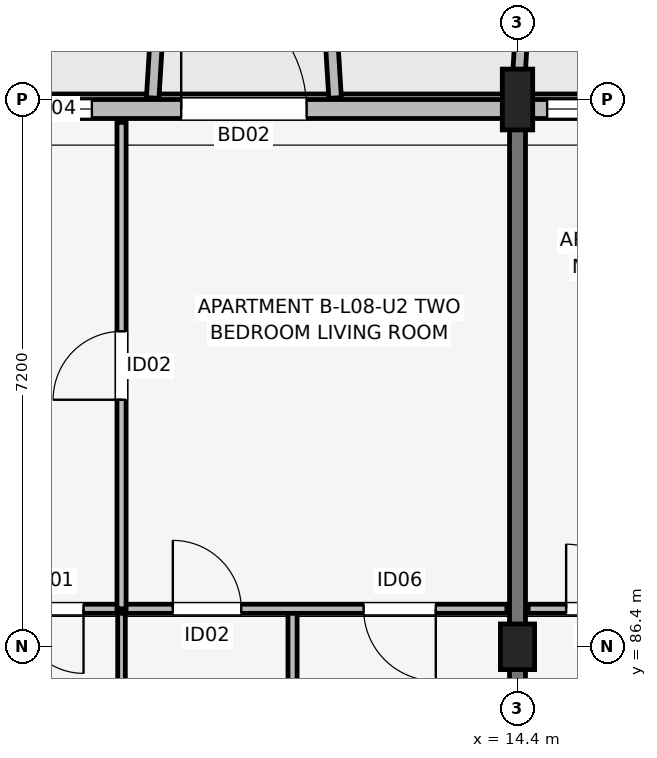
"""IFC4 building model, lengths in metres.
Left out: names, types, materials, properties, quantities, classifications, styles, units other than length and angle.
Written with IfcOpenShell. Run it as: python <this file> out.ifc"""

import sys

from ifc_helpers import new_model, si_unit, direction, frame, frame_2d, origin, origin_2d, place, context, subcontext, project, spatial, rectangle, extrude, element, fill, save


model = new_model("IFC4")
c1 = context("Model", 3, precision=1e-05, world=origin(), true_north=direction((0.0, 1.0)))
c2 = subcontext(c1, "Body", "Model", "MODEL_VIEW")
j1 = project(units=[si_unit("LENGTHUNIT", "METRE"), si_unit("PLANEANGLEUNIT", "RADIAN")], contexts=[c1])
p1 = place(None, origin())
s1 = spatial("IfcSite", under=j1, at=p1, CompositionType="ELEMENT")
p2 = place(p1, origin())
s2 = spatial("IfcBuilding", under=s1, at=p2, CompositionType="ELEMENT")
p3 = place(p2, frame((0.0, 0.0, 27.6)))
s3 = spatial("IfcBuildingStorey", under=s2, at=p3, CompositionType="ELEMENT", Elevation=27.6)
p4 = place(p3, frame((14.4, 86.4, 0.0), z_axis=(0.0, 0.0, 1.0), x_axis=(1.0, 0.0, 0.0)))
e1 = element("IfcColumn", 1, at=p4, inside=s3, PredefinedType="COLUMN", context=c2, shape_type="SweptSolid", body=[
    extrude(rectangle(XDim=0.45, YDim=0.6, at=origin_2d()), origin(), (0.0, 0.0, 1.0), 3.15),
])
p5 = place(p3, frame((14.4, 93.6, 0.0), z_axis=(0.0, 0.0, 1.0), x_axis=(1.0, 0.0, 0.0)))
e2 = element("IfcColumn", 2, at=p5, inside=s3, PredefinedType="COLUMN", context=c2, shape_type="SweptSolid", body=[
    extrude(rectangle(XDim=0.4, YDim=0.8, at=origin_2d()), origin(), (0.0, 0.0, 1.0), 3.15),
])
p6 = place(p3, frame((14.4, 83.85, 0.0), z_axis=(0.0, 0.0, 1.0), x_axis=(0.0, 1.0, 0.0)))
e3 = element("IfcWall", 3, at=p6, inside=s3, PredefinedType="SHEAR", context=c2, shape_type="SweptSolid", body=[
    extrude(rectangle(XDim=9.4, YDim=0.21, at=frame_2d((4.7, 0.0))), origin(), (0.0, 0.0, 1.0), 3.15),
])
p7 = place(p3, frame((32.8, 93.475, 0.0), z_axis=(0.0, 0.0, 1.0), x_axis=(-1.0, 0.0, 0.0)))
e4 = element("IfcWall", 4, at=p7, inside=s3, PredefinedType="SOLIDWALL", context=c2, shape_type="SweptSolid", body=[
    extrude(rectangle(XDim=29.6, YDim=0.25, at=frame_2d((14.8, 0.0))), origin(), (0.0, 0.0, 1.0), 2.43),
])
p8 = place(p7, frame((22.825, 0.0, 0.0), z_axis=(0.0, 0.0, 1.0), x_axis=(-1.0, 0.0, 0.0)))
e5 = element("IfcOpeningElement", 5, at=p8, cuts=e4, PredefinedType="OPENING", context=c2, shape_type="SweptSolid", body=[
    extrude(rectangle(XDim=1.65, YDim=2.15, at=frame_2d((0.825, 1.075))), frame((0.0, 0.135, 0.0), z_axis=(0.0, -1.0, 0.0), x_axis=(1.0, 0.0, 0.0)), (0.0, 0.0, 1.0), 0.27),
])
p9 = place(p7, frame((8.35, 0.0, 0.0), z_axis=(0.0, 0.0, 1.0), x_axis=(-1.0, 0.0, 0.0)))
e6 = element("IfcOpeningElement", 6, at=p9, cuts=e4, PredefinedType="OPENING", context=c2, shape_type="SweptSolid", body=[
    extrude(rectangle(XDim=1.5, YDim=2.15, at=frame_2d((0.75, 1.075))), frame((0.0, 0.135, 0.0), z_axis=(0.0, -1.0, 0.0), x_axis=(1.0, 0.0, 0.0)), (0.0, 0.0, 1.0), 0.27),
])
p10 = place(p7, frame((25.99, 0.0, 0.7)))
e7 = element("IfcOpeningElement", 7, at=p10, cuts=e4, PredefinedType="OPENING", context=c2, shape_type="SweptSolid", body=[
    extrude(rectangle(XDim=1.86, YDim=1.6, at=frame_2d((0.93, 0.8))), frame((0.0, 0.135, 0.0), z_axis=(0.0, -1.0, 0.0), x_axis=(1.0, 0.0, 0.0)), (0.0, 0.0, 1.0), 0.27),
])
p11 = place(p7, frame((24.0, 0.0, 0.75)))
e8 = element("IfcOpeningElement", 8, at=p11, cuts=e4, PredefinedType="OPENING", context=c2, shape_type="SweptSolid", body=[
    extrude(rectangle(XDim=0.98, YDim=1.45, at=frame_2d((0.49, 0.725))), frame((0.0, 0.135, 0.0), z_axis=(0.0, -1.0, 0.0), x_axis=(1.0, 0.0, 0.0)), (0.0, 0.0, 1.0), 0.27),
])
p12 = place(p7, frame((16.15, 0.0, 0.7)))
e9 = element("IfcOpeningElement", 9, at=p12, cuts=e4, PredefinedType="OPENING", context=c2, shape_type="SweptSolid", body=[
    extrude(rectangle(XDim=1.86, YDim=1.6, at=frame_2d((0.93, 0.8))), frame((0.0, 0.135, 0.0), z_axis=(0.0, -1.0, 0.0), x_axis=(1.0, 0.0, 0.0)), (0.0, 0.0, 1.0), 0.27),
])
p13 = place(p7, frame((11.91, 0.0, 0.75)))
e10 = element("IfcOpeningElement", 10, at=p13, cuts=e4, PredefinedType="OPENING", context=c2, shape_type="SweptSolid", body=[
    extrude(rectangle(XDim=1.22, YDim=1.5, at=frame_2d((0.61, 0.75))), frame((0.0, 0.135, 0.0), z_axis=(0.0, -1.0, 0.0), x_axis=(1.0, 0.0, 0.0)), (0.0, 0.0, 1.0), 0.27),
])
p14 = place(p7, frame((9.42, 0.0, 0.75)))
e11 = element("IfcOpeningElement", 11, at=p14, cuts=e4, PredefinedType="OPENING", context=c2, shape_type="SweptSolid", body=[
    extrude(rectangle(XDim=1.34, YDim=1.55, at=frame_2d((0.67, 0.775))), frame((0.0, 0.135, 0.0), z_axis=(0.0, -1.0, 0.0), x_axis=(1.0, 0.0, 0.0)), (0.0, 0.0, 1.0), 0.27),
])
p15 = place(p7, frame((2.16, 0.0, 0.75)))
e12 = element("IfcOpeningElement", 12, at=p15, cuts=e4, PredefinedType="OPENING", context=c2, shape_type="SweptSolid", body=[
    extrude(rectangle(XDim=1.46, YDim=1.55, at=frame_2d((0.73, 0.775))), frame((0.0, 0.135, 0.0), z_axis=(0.0, -1.0, 0.0), x_axis=(1.0, 0.0, 0.0)), (0.0, 0.0, 1.0), 0.27),
])
p16 = place(p7, frame((0.585, 0.0, 0.75)))
e13 = element("IfcOpeningElement", 13, at=p16, cuts=e4, PredefinedType="OPENING", context=c2, shape_type="SweptSolid", body=[
    extrude(rectangle(XDim=0.6, YDim=1.25, at=frame_2d((0.3, 0.625))), frame((0.0, 0.135, 0.0), z_axis=(0.0, -1.0, 0.0), x_axis=(1.0, 0.0, 0.0)), (0.0, 0.0, 1.0), 0.27),
])
for number, where, z_axis, x_axis in (
    (14, (9.6, 93.62, 0.0), (0.0, 0.0, 1.0), (0.061, 0.998, 0.0)),
    (15, (12.0, 93.62, 0.0), (0.0, 0.0, 1.0), (-0.061, 0.998, 0.0)),
):
    element("IfcWall", number, at=place(p3, frame(where, z_axis=z_axis, x_axis=x_axis)), inside=s3, PredefinedType="ELEMENTEDWALL", context=c2, shape_type="SweptSolid", body=[
        extrude(rectangle(XDim=1.964, YDim=0.165, at=frame_2d((0.982, 0.0))), origin(), (0.0, 0.0, 1.0), 2.55),
    ])
p17 = place(p3, frame((14.4, 93.62, 0.0), z_axis=(0.0, 0.0, 1.0), x_axis=(0.061170732449, 0.998127317276, 0.0)))
e16 = element("IfcWall", 16, at=p17, inside=s3, PredefinedType="ELEMENTEDWALL", context=c2, shape_type="SweptSolid", body=[
    extrude(rectangle(XDim=1.964, YDim=0.165, at=frame_2d((0.982, 0.0))), origin(), (0.0, 0.0, 1.0), 2.58),
])
p18 = place(p3, frame((9.19, 83.7, 0.0), z_axis=(0.0, 0.0, 1.0), x_axis=(0.0, 1.0, 0.0)))
e17 = element("IfcWall", 17, at=p18, inside=s3, PredefinedType="PARTITIONING", context=c2, shape_type="SweptSolid", body=[
    extrude(rectangle(XDim=3.2, YDim=0.1, at=frame_2d((1.6, 0.0))), origin(), (0.0, 0.0, 1.0), 2.38),
])
p19 = place(p3, frame((11.44, 83.7, 0.0), z_axis=(0.0, 0.0, 1.0), x_axis=(0.0, 1.0, 0.0)))
e18 = element("IfcWall", 18, at=p19, inside=s3, PredefinedType="PARTITIONING", context=c2, shape_type="SweptSolid", body=[
    extrude(rectangle(XDim=3.2, YDim=0.12, at=frame_2d((1.6, 0.0))), origin(), (0.0, 0.0, 1.0), 2.38),
])
p20 = place(p3, frame((7.34, 86.9, 0.0), z_axis=(0.0, 0.0, 1.0), x_axis=(1.0, 0.0, 0.0)))
e19 = element("IfcWall", 19, at=p20, inside=s3, PredefinedType="PARTITIONING", context=c2, shape_type="SweptSolid", body=[
    extrude(rectangle(XDim=6.92, YDim=0.12, at=frame_2d((3.46, 0.0))), origin(), (0.0, 0.0, 1.0), 2.38),
])
p21 = place(p20, frame((1.35, 0.0, 0.0), z_axis=(0.0, 0.0, 1.0), x_axis=(-1.0, 0.0, 0.0)))
e20 = element("IfcOpeningElement", 20, at=p21, cuts=e19, PredefinedType="OPENING", context=c2, shape_type="SweptSolid", body=[
    extrude(rectangle(XDim=0.85, YDim=2.08, at=frame_2d((0.425, 1.04))), frame((0.0, 0.07, 0.0), z_axis=(0.0, -1.0, 0.0), x_axis=(1.0, 0.0, 0.0)), (0.0, 0.0, 1.0), 0.14),
])
p22 = place(p20, frame((2.525, 0.0, 0.0)))
e21 = element("IfcOpeningElement", 21, at=p22, cuts=e19, PredefinedType="OPENING", context=c2, shape_type="SweptSolid", body=[
    extrude(rectangle(XDim=0.9, YDim=2.08, at=frame_2d((0.45, 1.04))), frame((0.0, 0.07, 0.0), z_axis=(0.0, -1.0, 0.0), x_axis=(1.0, 0.0, 0.0)), (0.0, 0.0, 1.0), 0.14),
])
p23 = place(p20, frame((5.985, 0.0, 0.0), z_axis=(0.0, 0.0, 1.0), x_axis=(-1.0, 0.0, 0.0)))
e22 = element("IfcOpeningElement", 22, at=p23, cuts=e19, PredefinedType="OPENING", context=c2, shape_type="SweptSolid", body=[
    extrude(rectangle(XDim=0.95, YDim=2.08, at=frame_2d((0.475, 1.04))), frame((0.0, 0.07, 0.0), z_axis=(0.0, -1.0, 0.0), x_axis=(1.0, 0.0, 0.0)), (0.0, 0.0, 1.0), 0.14),
])
p24 = place(p3, frame((9.19, 86.9, 0.0), z_axis=(0.0, 0.0, 1.0), x_axis=(0.0, 1.0, 0.0)))
e23 = element("IfcWall", 23, at=p24, inside=s3, PredefinedType="PARTITIONING", context=c2, shape_type="SweptSolid", body=[
    extrude(rectangle(XDim=6.4, YDim=0.12, at=frame_2d((3.2, 0.0))), origin(), (0.0, 0.0, 1.0), 2.38),
])
p25 = place(p24, frame((2.75, 0.0, 0.0)))
e24 = element("IfcOpeningElement", 24, at=p25, cuts=e23, PredefinedType="OPENING", context=c2, shape_type="SweptSolid", body=[
    extrude(rectangle(XDim=0.9, YDim=2.08, at=frame_2d((0.45, 1.04))), frame((0.0, 0.07, 0.0), z_axis=(0.0, -1.0, 0.0), x_axis=(1.0, 0.0, 0.0)), (0.0, 0.0, 1.0), 0.14),
])
p26 = place(p3, frame((14.54, 86.9, 0.0), z_axis=(0.0, 0.0, 1.0), x_axis=(1.0, 0.0, 0.0)))
e25 = element("IfcWall", 25, at=p26, inside=s3, PredefinedType="PARTITIONING", context=c2, shape_type="SweptSolid", body=[
    extrude(rectangle(XDim=6.92, YDim=0.12, at=frame_2d((3.46, 0.0))), origin(), (0.0, 0.0, 1.0), 2.38),
])
p27 = place(p26, frame((0.5, 0.0, 0.0)))
e26 = element("IfcOpeningElement", 26, at=p27, cuts=e25, PredefinedType="OPENING", context=c2, shape_type="SweptSolid", body=[
    extrude(rectangle(XDim=0.85, YDim=2.08, at=frame_2d((0.425, 1.04))), frame((0.0, 0.07, 0.0), z_axis=(0.0, -1.0, 0.0), x_axis=(1.0, 0.0, 0.0)), (0.0, 0.0, 1.0), 0.14),
])
p28 = place(p26, frame((3.275, 0.0, 0.0), z_axis=(0.0, 0.0, 1.0), x_axis=(-1.0, 0.0, 0.0)))
e27 = element("IfcOpeningElement", 27, at=p28, cuts=e25, PredefinedType="OPENING", context=c2, shape_type="SweptSolid", body=[
    extrude(rectangle(XDim=0.9, YDim=2.08, at=frame_2d((0.45, 1.04))), frame((0.0, 0.07, 0.0), z_axis=(0.0, -1.0, 0.0), x_axis=(1.0, 0.0, 0.0)), (0.0, 0.0, 1.0), 0.14),
])
p29 = place(p26, frame((4.885, 0.0, 0.0)))
e28 = element("IfcOpeningElement", 28, at=p29, cuts=e25, PredefinedType="OPENING", context=c2, shape_type="SweptSolid", body=[
    extrude(rectangle(XDim=0.95, YDim=2.08, at=frame_2d((0.475, 1.04))), frame((0.0, 0.07, 0.0), z_axis=(0.0, -1.0, 0.0), x_axis=(1.0, 0.0, 0.0)), (0.0, 0.0, 1.0), 0.14),
])
p30 = place(p8, origin())
e29 = element("IfcDoor", 29, at=p30, inside=s3, OperationType="SINGLE_SWING_RIGHT", PredefinedType="DOOR", context=c2, shape_type="SweptSolid", body=[
    extrude(rectangle(XDim=1.65, YDim=2.15, at=frame_2d((0.825, 1.075))), frame((0.0, 0.025, 0.0), z_axis=(0.0, -1.0, 0.0), x_axis=(1.0, 0.0, 0.0)), (0.0, 0.0, 1.0), 0.05),
])
fill(e5, e29)
p31 = place(p11, origin())
e30 = element("IfcWindow", 30, at=p31, inside=s3, PartitioningType="SINGLE_PANEL", PredefinedType="WINDOW", context=c2, shape_type="SweptSolid", body=[
    extrude(rectangle(XDim=0.98, YDim=1.45, at=frame_2d((0.49, 0.725))), frame((0.0, 0.03, 0.0), z_axis=(0.0, -1.0, 0.0), x_axis=(1.0, 0.0, 0.0)), (0.0, 0.0, 1.0), 0.06),
])
fill(e8, e30)
p32 = place(p12, origin())
e31 = element("IfcWindow", 31, at=p32, inside=s3, PartitioningType="SINGLE_PANEL", PredefinedType="WINDOW", context=c2, shape_type="SweptSolid", body=[
    extrude(rectangle(XDim=1.86, YDim=1.6, at=frame_2d((0.93, 0.8))), frame((0.0, 0.03, 0.0), z_axis=(0.0, -1.0, 0.0), x_axis=(1.0, 0.0, 0.0)), (0.0, 0.0, 1.0), 0.06),
])
fill(e9, e31)
p33 = place(p21, origin())
e32 = element("IfcDoor", 32, at=p33, inside=s3, OperationType="SINGLE_SWING_RIGHT", PredefinedType="DOOR", context=c2, shape_type="SweptSolid", body=[
    extrude(rectangle(XDim=0.85, YDim=2.08, at=frame_2d((0.425, 1.04))), frame((0.0, 0.025, 0.0), z_axis=(0.0, -1.0, 0.0), x_axis=(1.0, 0.0, 0.0)), (0.0, 0.0, 1.0), 0.05),
])
fill(e20, e32)
p34 = place(p22, origin())
e33 = element("IfcDoor", 33, at=p34, inside=s3, OperationType="SINGLE_SWING_LEFT", PredefinedType="DOOR", context=c2, shape_type="SweptSolid", body=[
    extrude(rectangle(XDim=0.9, YDim=2.08, at=frame_2d((0.45, 1.04))), frame((0.0, 0.025, 0.0), z_axis=(0.0, -1.0, 0.0), x_axis=(1.0, 0.0, 0.0)), (0.0, 0.0, 1.0), 0.05),
])
fill(e21, e33)
p35 = place(p23, origin())
e34 = element("IfcDoor", 34, at=p35, inside=s3, OperationType="SINGLE_SWING_RIGHT", PredefinedType="DOOR", context=c2, shape_type="SweptSolid", body=[
    extrude(rectangle(XDim=0.95, YDim=2.08, at=frame_2d((0.475, 1.04))), frame((0.0, 0.025, 0.0), z_axis=(0.0, -1.0, 0.0), x_axis=(1.0, 0.0, 0.0)), (0.0, 0.0, 1.0), 0.05),
])
fill(e22, e34)
p36 = place(p25, origin())
e35 = element("IfcDoor", 35, at=p36, inside=s3, OperationType="SINGLE_SWING_LEFT", PredefinedType="DOOR", context=c2, shape_type="SweptSolid", body=[
    extrude(rectangle(XDim=0.9, YDim=2.08, at=frame_2d((0.45, 1.04))), frame((0.0, 0.025, 0.0), z_axis=(0.0, -1.0, 0.0), x_axis=(1.0, 0.0, 0.0)), (0.0, 0.0, 1.0), 0.05),
])
fill(e24, e35)
p37 = place(p27, origin())
e36 = element("IfcDoor", 36, at=p37, inside=s3, OperationType="SINGLE_SWING_LEFT", PredefinedType="DOOR", context=c2, shape_type="SweptSolid", body=[
    extrude(rectangle(XDim=0.85, YDim=2.08, at=frame_2d((0.425, 1.04))), frame((0.0, 0.025, 0.0), z_axis=(0.0, -1.0, 0.0), x_axis=(1.0, 0.0, 0.0)), (0.0, 0.0, 1.0), 0.05),
])
fill(e26, e36)
save(model, sys.argv[1])
